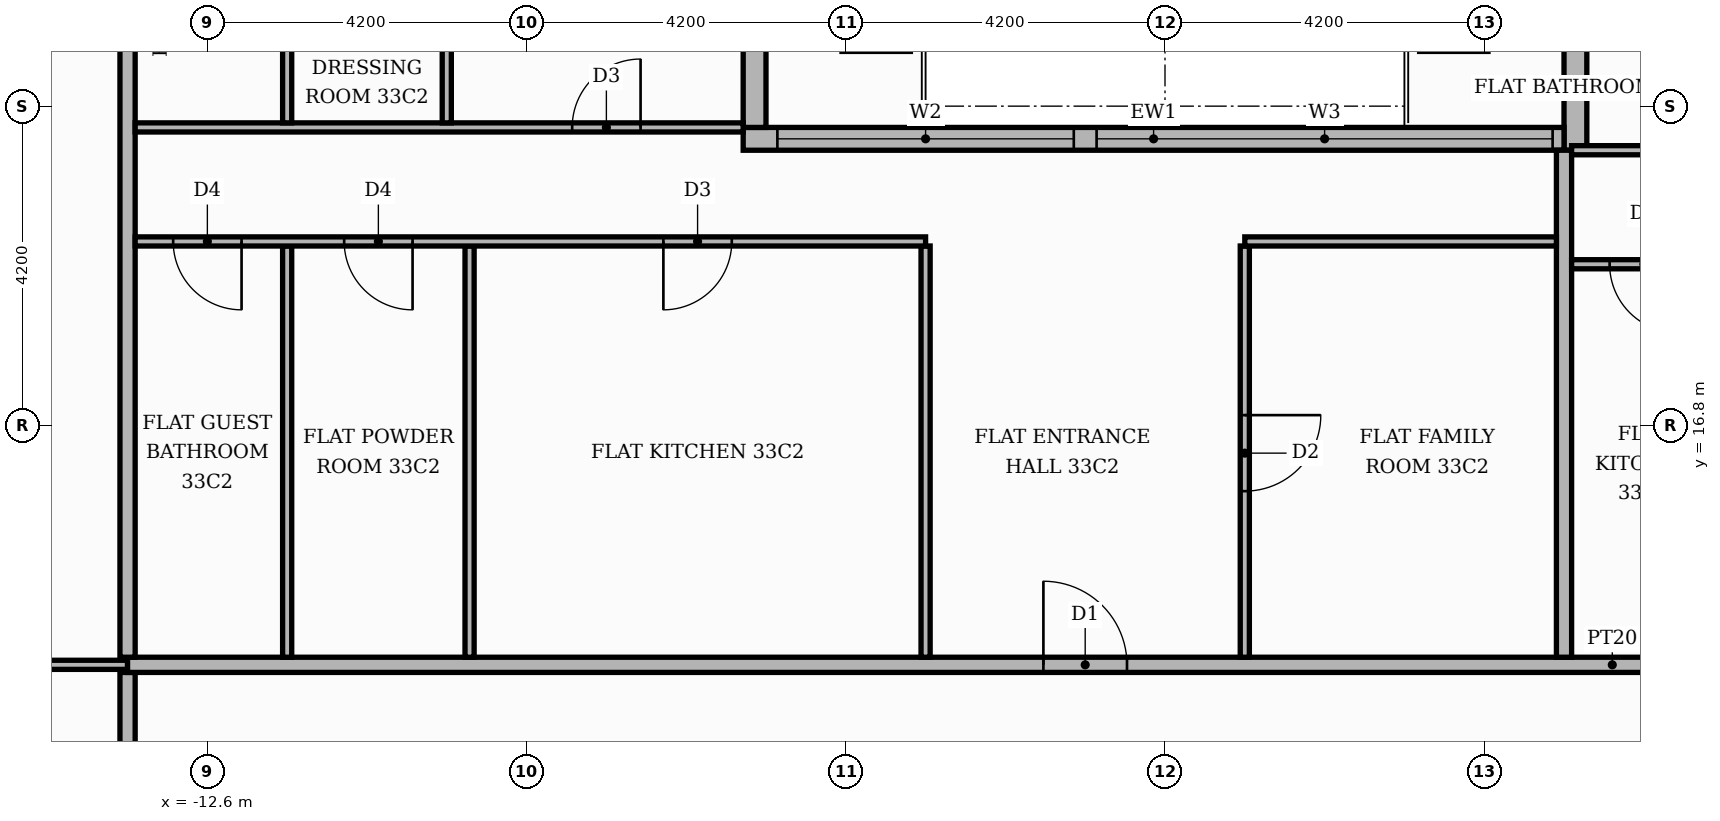
"""IFC4 building model, lengths in metres.
Left out: names, types, materials, properties, quantities, classifications, styles, units other than length and angle.
Written with IfcOpenShell. Run it as: python <this file> out.ifc"""

import sys

from ifc_helpers import new_model, si_unit, direction, frame, frame_2d, origin, place, context, subcontext, project, spatial, rectangle, extrude, element, fill, save


model = new_model("IFC4")
c1 = context("Model", 3, precision=1e-05, world=origin(), true_north=direction((0.0, 1.0)))
c2 = subcontext(c1, "Body", "Model", "MODEL_VIEW")
j1 = project(units=[si_unit("LENGTHUNIT", "METRE"), si_unit("PLANEANGLEUNIT", "RADIAN")], contexts=[c1])
p1 = place(None, origin())
s1 = spatial("IfcSite", under=j1, at=p1, CompositionType="ELEMENT")
p2 = place(p1, origin())
s2 = spatial("IfcBuilding", under=s1, at=p2, CompositionType="ELEMENT")
p3 = place(p2, frame((0.0, 0.0, 141.6)))
s3 = spatial("IfcBuildingStorey", under=s2, at=p3, CompositionType="ELEMENT", Elevation=141.6)
p4 = place(p3, frame((5.4, 25.42, 0.0), z_axis=(0.0, 0.0, 1.0), x_axis=(0.0, -1.0, 0.0)))
e1 = element("IfcWall", 1, at=p4, inside=s3, PredefinedType="STANDARD", context=c2, shape_type="SweptSolid", body=[
    extrude(rectangle(XDim=5.0, YDim=0.3, at=frame_2d((2.5, 0.0))), origin(), (0.0, 0.0, 1.0), 3.48),
])
p5 = place(p4, frame((1.42, 0.0, 0.0)))
e2 = element("IfcOpeningElement", 2, at=p5, cuts=e1, PredefinedType="OPENING", context=c2, shape_type="SweptSolid", body=[
    extrude(rectangle(XDim=1.8, YDim=2.4, at=frame_2d((0.9, 1.2))), frame((0.0, 0.16, 0.0), z_axis=(0.0, -1.0, 0.0), x_axis=(1.0, 0.0, 0.0)), (0.0, 0.0, 1.0), 0.32),
])
p6 = place(p3, frame((5.25, 20.57, 0.0), z_axis=(0.0, 0.0, 1.0), x_axis=(-1.0, 0.0, 0.0)))
e3 = element("IfcWall", 3, at=p6, inside=s3, PredefinedType="STANDARD", context=c2, shape_type="SweptSolid", body=[
    extrude(rectangle(XDim=10.8, YDim=0.3, at=frame_2d((5.4, 0.0))), origin(), (0.0, 0.0, 1.0), 3.48),
])
p7 = place(p6, frame((0.15, 0.0, 0.9)))
e4 = element("IfcOpeningElement", 4, at=p7, cuts=e3, PredefinedType="OPENING", context=c2, shape_type="SweptSolid", body=[
    extrude(rectangle(XDim=6.0, YDim=2.1, at=frame_2d((3.0, 1.05))), frame((0.0, 0.16, 0.0), z_axis=(0.0, -1.0, 0.0), x_axis=(1.0, 0.0, 0.0)), (0.0, 0.0, 1.0), 0.32),
])
p8 = place(p6, frame((6.45, 0.0, 0.9)))
e5 = element("IfcOpeningElement", 5, at=p8, cuts=e3, PredefinedType="OPENING", context=c2, shape_type="SweptSolid", body=[
    extrude(rectangle(XDim=3.9, YDim=2.1, at=frame_2d((1.95, 1.05))), frame((0.0, 0.16, 0.0), z_axis=(0.0, -1.0, 0.0), x_axis=(1.0, 0.0, 0.0)), (0.0, 0.0, 1.0), 0.32),
])
p9 = place(p3, frame((-5.4, 20.72, 0.0), z_axis=(0.0, 0.0, 1.0), x_axis=(0.0, 1.0, 0.0)))
e6 = element("IfcWall", 6, at=p9, inside=s3, PredefinedType="STANDARD", context=c2, shape_type="SweptSolid", body=[
    extrude(rectangle(XDim=5.0, YDim=0.3, at=frame_2d((2.5, 0.0))), origin(), (0.0, 0.0, 1.0), 3.48),
])
p10 = place(p9, frame((1.48, 0.0, 0.0)))
e7 = element("IfcOpeningElement", 7, at=p10, cuts=e6, PredefinedType="OPENING", context=c2, shape_type="SweptSolid", body=[
    extrude(rectangle(XDim=1.8, YDim=2.4, at=frame_2d((0.9, 1.2))), frame((0.0, 0.16, 0.0), z_axis=(0.0, -1.0, 0.0), x_axis=(1.0, 0.0, 0.0)), (0.0, 0.0, 1.0), 0.32),
])
p11 = place(p3, frame((-13.65, 11.1, 0.0), z_axis=(0.0, 0.0, 1.0), x_axis=(0.0, 1.0, 0.0)))
e8 = element("IfcWall", 8, at=p11, inside=s3, PredefinedType="PARTITIONING", context=c2, shape_type="SweptSolid", body=[
    extrude(rectangle(XDim=2.45, YDim=0.2, at=frame_2d((1.225, 0.0))), origin(), (0.0, 0.0, 1.0), 3.48),
])
p12 = place(p3, frame((-20.42, 13.65, 0.0), z_axis=(0.0, 0.0, 1.0), x_axis=(1.0, 0.0, 0.0)))
e9 = element("IfcWall", 9, at=p12, inside=s3, PredefinedType="PARTITIONING", context=c2, shape_type="SweptSolid", body=[
    extrude(rectangle(XDim=6.77, YDim=0.12, at=frame_2d((3.385, 0.0))), origin(), (0.0, 0.0, 1.0), 3.48),
])
p13 = place(p12, frame((2.935, 0.0, 0.0)))
e10 = element("IfcOpeningElement", 10, at=p13, cuts=e9, PredefinedType="OPENING", context=c2, shape_type="SweptSolid", body=[
    extrude(rectangle(XDim=0.9, YDim=2.1, at=frame_2d((0.45, 1.05))), frame((0.0, 0.07, 0.0), z_axis=(0.0, -1.0, 0.0), x_axis=(1.0, 0.0, 0.0)), (0.0, 0.0, 1.0), 0.14),
])
p14 = place(p3, frame((-13.65, 13.65, 0.0), z_axis=(0.0, 0.0, 1.0), x_axis=(1.0, 0.0, 0.0)))
e11 = element("IfcWall", 11, at=p14, inside=s3, PredefinedType="PARTITIONING", context=c2, shape_type="SweptSolid", body=[
    extrude(rectangle(XDim=39.07, YDim=0.2, at=frame_2d((19.535, 0.0))), origin(), (0.0, 0.0, 1.0), 3.48),
])
p15 = place(p14, frame((24.65, 0.0, 0.0)))
e12 = element("IfcOpeningElement", 12, at=p15, cuts=e11, PredefinedType="OPENING", context=c2, shape_type="SweptSolid", body=[
    extrude(rectangle(XDim=1.1, YDim=2.4, at=frame_2d((0.55, 1.2))), frame((0.0, 0.11, 0.0), z_axis=(0.0, -1.0, 0.0), x_axis=(1.0, 0.0, 0.0)), (0.0, 0.0, 1.0), 0.22),
])
p16 = place(p14, frame((12.05, 0.0, 0.0)))
e13 = element("IfcOpeningElement", 13, at=p16, cuts=e11, PredefinedType="OPENING", context=c2, shape_type="SweptSolid", body=[
    extrude(rectangle(XDim=1.1, YDim=2.4, at=frame_2d((0.55, 1.2))), frame((0.0, 0.11, 0.0), z_axis=(0.0, -1.0, 0.0), x_axis=(1.0, 0.0, 0.0)), (0.0, 0.0, 1.0), 0.22),
])
p17 = place(p3, frame((-13.65, 13.75, 0.0), z_axis=(0.0, 0.0, 1.0), x_axis=(0.0, 1.0, 0.0)))
e14 = element("IfcWall", 14, at=p17, inside=s3, PredefinedType="PARTITIONING", context=c2, shape_type="SweptSolid", body=[
    extrude(rectangle(XDim=11.67, YDim=0.2, at=frame_2d((5.835, 0.0))), origin(), (0.0, 0.0, 1.0), 3.48),
])
for number, where, z_axis, x_axis in (
    (15, (-11.55, 13.75, 0.0), (0.0, 0.0, 1.0), (0.0, 1.0, 0.0)),
    (16, (-9.15, 13.75, 0.0), (0.0, 0.0, 1.0), (0.0, 1.0, 0.0)),
    (17, (-3.15, 13.75, 0.0), (0.0, 0.0, 1.0), (0.0, 1.0, 0.0)),
):
    element("IfcWall", number, at=place(p3, frame(where, z_axis=z_axis, x_axis=x_axis)), inside=s3, PredefinedType="PARTITIONING", context=c2, shape_type="SweptSolid", body=[
        extrude(rectangle(XDim=5.41, YDim=0.12, at=frame_2d((2.705, 0.0))), origin(), (0.0, 0.0, 1.0), 3.48),
    ])
p18 = place(p3, frame((1.05, 13.75, 0.0), z_axis=(0.0, 0.0, 1.0), x_axis=(0.0, 1.0, 0.0)))
e18 = element("IfcWall", 18, at=p18, inside=s3, PredefinedType="PARTITIONING", context=c2, shape_type="SweptSolid", body=[
    extrude(rectangle(XDim=5.41, YDim=0.12, at=frame_2d((2.705, 0.0))), origin(), (0.0, 0.0, 1.0), 3.48),
])
p19 = place(p18, frame((2.185, 0.0, 0.0)))
e19 = element("IfcOpeningElement", 19, at=p19, cuts=e18, PredefinedType="OPENING", context=c2, shape_type="SweptSolid", body=[
    extrude(rectangle(XDim=1.0, YDim=2.1, at=frame_2d((0.5, 1.05))), frame((0.0, 0.07, 0.0), z_axis=(0.0, -1.0, 0.0), x_axis=(1.0, 0.0, 0.0)), (0.0, 0.0, 1.0), 0.14),
])
p20 = place(p3, frame((5.25, 13.75, 0.0), z_axis=(0.0, 0.0, 1.0), x_axis=(0.0, 1.0, 0.0)))
e20 = element("IfcWall", 20, at=p20, inside=s3, PredefinedType="PARTITIONING", context=c2, shape_type="SweptSolid", body=[
    extrude(rectangle(XDim=6.67, YDim=0.2, at=frame_2d((3.335, 0.0))), origin(), (0.0, 0.0, 1.0), 3.48),
])
p21 = place(p3, frame((5.35, 18.92, 0.0), z_axis=(0.0, 0.0, 1.0), x_axis=(1.0, 0.0, 0.0)))
e21 = element("IfcWall", 21, at=p21, inside=s3, PredefinedType="PARTITIONING", context=c2, shape_type="SweptSolid", body=[
    extrude(rectangle(XDim=4.1, YDim=0.12, at=frame_2d((2.05, 0.0))), origin(), (0.0, 0.0, 1.0), 3.48),
])
p22 = place(p21, frame((0.5, 0.0, 0.0)))
e22 = element("IfcOpeningElement", 22, at=p22, cuts=e21, PredefinedType="OPENING", context=c2, shape_type="SweptSolid", body=[
    extrude(rectangle(XDim=0.9, YDim=2.1, at=frame_2d((0.45, 1.05))), frame((0.0, 0.07, 0.0), z_axis=(0.0, -1.0, 0.0), x_axis=(1.0, 0.0, 0.0)), (0.0, 0.0, 1.0), 0.14),
])
p23 = place(p3, frame((-13.55, 19.22, 0.0), z_axis=(0.0, 0.0, 1.0), x_axis=(1.0, 0.0, 0.0)))
e23 = element("IfcWall", 23, at=p23, inside=s3, PredefinedType="PARTITIONING", context=c2, shape_type="SweptSolid", body=[
    extrude(rectangle(XDim=10.4, YDim=0.12, at=frame_2d((5.2, 0.0))), origin(), (0.0, 0.0, 1.0), 3.48),
])
p24 = place(p23, frame((6.95, 0.0, 0.0)))
e24 = element("IfcOpeningElement", 24, at=p24, cuts=e23, PredefinedType="OPENING", context=c2, shape_type="SweptSolid", body=[
    extrude(rectangle(XDim=0.9, YDim=2.1, at=frame_2d((0.45, 1.05))), frame((0.0, 0.07, 0.0), z_axis=(0.0, -1.0, 0.0), x_axis=(1.0, 0.0, 0.0)), (0.0, 0.0, 1.0), 0.14),
])
p25 = place(p23, frame((2.75, 0.0, 0.0)))
e25 = element("IfcOpeningElement", 25, at=p25, cuts=e23, PredefinedType="OPENING", context=c2, shape_type="SweptSolid", body=[
    extrude(rectangle(XDim=0.9, YDim=2.1, at=frame_2d((0.45, 1.05))), frame((0.0, 0.07, 0.0), z_axis=(0.0, -1.0, 0.0), x_axis=(1.0, 0.0, 0.0)), (0.0, 0.0, 1.0), 0.14),
])
p26 = place(p23, frame((0.5, 0.0, 0.0)))
e26 = element("IfcOpeningElement", 26, at=p26, cuts=e23, PredefinedType="OPENING", context=c2, shape_type="SweptSolid", body=[
    extrude(rectangle(XDim=0.9, YDim=2.1, at=frame_2d((0.45, 1.05))), frame((0.0, 0.07, 0.0), z_axis=(0.0, -1.0, 0.0), x_axis=(1.0, 0.0, 0.0)), (0.0, 0.0, 1.0), 0.14),
])
p27 = place(p3, frame((1.05, 19.22, 0.0), z_axis=(0.0, 0.0, 1.0), x_axis=(1.0, 0.0, 0.0)))
e27 = element("IfcWall", 27, at=p27, inside=s3, PredefinedType="PARTITIONING", context=c2, shape_type="SweptSolid", body=[
    extrude(rectangle(XDim=4.1, YDim=0.12, at=frame_2d((2.05, 0.0))), origin(), (0.0, 0.0, 1.0), 3.48),
])
p28 = place(p3, frame((5.35, 20.42, 0.0), z_axis=(0.0, 0.0, 1.0), x_axis=(1.0, 0.0, 0.0)))
e28 = element("IfcWall", 28, at=p28, inside=s3, PredefinedType="PARTITIONING", context=c2, shape_type="SweptSolid", body=[
    extrude(rectangle(XDim=20.07, YDim=0.12, at=frame_2d((10.035, 0.0))), origin(), (0.0, 0.0, 1.0), 3.48),
])
p29 = place(p28, frame((8.85, 0.0, 0.0)))
e29 = element("IfcOpeningElement", 29, at=p29, cuts=e28, PredefinedType="OPENING", context=c2, shape_type="SweptSolid", body=[
    extrude(rectangle(XDim=1.0, YDim=2.1, at=frame_2d((0.5, 1.05))), frame((0.0, 0.07, 0.0), z_axis=(0.0, -1.0, 0.0), x_axis=(1.0, 0.0, 0.0)), (0.0, 0.0, 1.0), 0.14),
])
p30 = place(p28, frame((5.75, 0.0, 0.0)))
e30 = element("IfcOpeningElement", 30, at=p30, cuts=e28, PredefinedType="OPENING", context=c2, shape_type="SweptSolid", body=[
    extrude(rectangle(XDim=0.9, YDim=2.1, at=frame_2d((0.45, 1.05))), frame((0.0, 0.07, 0.0), z_axis=(0.0, -1.0, 0.0), x_axis=(1.0, 0.0, 0.0)), (0.0, 0.0, 1.0), 0.14),
])
p31 = place(p3, frame((-13.55, 20.72, 0.0), z_axis=(0.0, 0.0, 1.0), x_axis=(1.0, 0.0, 0.0)))
e31 = element("IfcWall", 31, at=p31, inside=s3, PredefinedType="PARTITIONING", context=c2, shape_type="SweptSolid", body=[
    extrude(rectangle(XDim=8.0, YDim=0.12, at=frame_2d((4.0, 0.0))), origin(), (0.0, 0.0, 1.0), 3.48),
])
p32 = place(p31, frame((5.75, 0.0, 0.0)))
e32 = element("IfcOpeningElement", 32, at=p32, cuts=e31, PredefinedType="OPENING", context=c2, shape_type="SweptSolid", body=[
    extrude(rectangle(XDim=0.9, YDim=2.1, at=frame_2d((0.45, 1.05))), frame((0.0, 0.07, 0.0), z_axis=(0.0, -1.0, 0.0), x_axis=(1.0, 0.0, 0.0)), (0.0, 0.0, 1.0), 0.14),
])
p33 = place(p3, frame((-11.55, 20.78, 0.0), z_axis=(0.0, 0.0, 1.0), x_axis=(0.0, 1.0, 0.0)))
e33 = element("IfcWall", 33, at=p33, inside=s3, PredefinedType="PARTITIONING", context=c2, shape_type="SweptSolid", body=[
    extrude(rectangle(XDim=4.64, YDim=0.12, at=frame_2d((2.32, 0.0))), origin(), (0.0, 0.0, 1.0), 3.48),
])
p34 = place(p33, frame((1.99, 0.0, 0.0)))
e34 = element("IfcOpeningElement", 34, at=p34, cuts=e33, PredefinedType="OPENING", context=c2, shape_type="SweptSolid", body=[
    extrude(rectangle(XDim=0.9, YDim=2.1, at=frame_2d((0.45, 1.05))), frame((0.0, 0.07, 0.0), z_axis=(0.0, -1.0, 0.0), x_axis=(1.0, 0.0, 0.0)), (0.0, 0.0, 1.0), 0.14),
])
p35 = place(p3, frame((-9.45, 20.78, 0.0), z_axis=(0.0, 0.0, 1.0), x_axis=(0.0, 1.0, 0.0)))
e35 = element("IfcWall", 35, at=p35, inside=s3, PredefinedType="PARTITIONING", context=c2, shape_type="SweptSolid", body=[
    extrude(rectangle(XDim=4.64, YDim=0.12, at=frame_2d((2.32, 0.0))), origin(), (0.0, 0.0, 1.0), 3.48),
])
p36 = place(p35, frame((1.99, 0.0, 0.0)))
e36 = element("IfcOpeningElement", 36, at=p36, cuts=e35, PredefinedType="OPENING", context=c2, shape_type="SweptSolid", body=[
    extrude(rectangle(XDim=0.9, YDim=2.1, at=frame_2d((0.45, 1.05))), frame((0.0, 0.07, 0.0), z_axis=(0.0, -1.0, 0.0), x_axis=(1.0, 0.0, 0.0)), (0.0, 0.0, 1.0), 0.14),
])
p37 = place(p7, origin())
e37 = element("IfcWindow", 37, at=p37, inside=s3, PartitioningType="SINGLE_PANEL", PredefinedType="WINDOW", context=c2, shape_type="SweptSolid", body=[
    extrude(rectangle(XDim=6.0, YDim=2.1, at=frame_2d((3.0, 1.05))), frame((0.0, 0.03, 0.0), z_axis=(0.0, -1.0, 0.0), x_axis=(1.0, 0.0, 0.0)), (0.0, 0.0, 1.0), 0.06),
])
fill(e4, e37)
p38 = place(p8, origin())
e38 = element("IfcWindow", 38, at=p38, inside=s3, PartitioningType="SINGLE_PANEL", PredefinedType="WINDOW", context=c2, shape_type="SweptSolid", body=[
    extrude(rectangle(XDim=3.9, YDim=2.1, at=frame_2d((1.95, 1.05))), frame((0.0, 0.03, 0.0), z_axis=(0.0, -1.0, 0.0), x_axis=(1.0, 0.0, 0.0)), (0.0, 0.0, 1.0), 0.06),
])
fill(e5, e38)
p39 = place(p22, frame((0.9, 0.0, 0.0), z_axis=(0.0, 0.0, 1.0), x_axis=(-1.0, 0.0, 0.0)))
e39 = element("IfcDoor", 39, at=p39, inside=s3, OperationType="SINGLE_SWING_RIGHT", PredefinedType="DOOR", context=c2, shape_type="SweptSolid", body=[
    extrude(rectangle(XDim=0.9, YDim=2.1, at=frame_2d((0.45, 1.05))), frame((0.0, 0.025, 0.0), z_axis=(0.0, -1.0, 0.0), x_axis=(1.0, 0.0, 0.0)), (0.0, 0.0, 1.0), 0.05),
])
fill(e22, e39)
p40 = place(p16, origin())
e40 = element("IfcDoor", 40, at=p40, inside=s3, OperationType="SINGLE_SWING_LEFT", PredefinedType="DOOR", context=c2, shape_type="SweptSolid", body=[
    extrude(rectangle(XDim=1.1, YDim=2.4, at=frame_2d((0.55, 1.2))), frame((0.0, 0.025, 0.0), z_axis=(0.0, -1.0, 0.0), x_axis=(1.0, 0.0, 0.0)), (0.0, 0.0, 1.0), 0.05),
])
fill(e13, e40)
p41 = place(p19, frame((1.0, 0.0, 0.0), z_axis=(0.0, 0.0, 1.0), x_axis=(-1.0, 0.0, 0.0)))
e41 = element("IfcDoor", 41, at=p41, inside=s3, OperationType="SINGLE_SWING_RIGHT", PredefinedType="DOOR", context=c2, shape_type="SweptSolid", body=[
    extrude(rectangle(XDim=1.0, YDim=2.1, at=frame_2d((0.5, 1.05))), frame((0.0, 0.025, 0.0), z_axis=(0.0, -1.0, 0.0), x_axis=(1.0, 0.0, 0.0)), (0.0, 0.0, 1.0), 0.05),
])
fill(e19, e41)
p42 = place(p24, frame((0.9, 0.0, 0.0), z_axis=(0.0, 0.0, 1.0), x_axis=(-1.0, 0.0, 0.0)))
e42 = element("IfcDoor", 42, at=p42, inside=s3, OperationType="SINGLE_SWING_LEFT", PredefinedType="DOOR", context=c2, shape_type="SweptSolid", body=[
    extrude(rectangle(XDim=0.9, YDim=2.1, at=frame_2d((0.45, 1.05))), frame((0.0, 0.025, 0.0), z_axis=(0.0, -1.0, 0.0), x_axis=(1.0, 0.0, 0.0)), (0.0, 0.0, 1.0), 0.05),
])
fill(e24, e42)
p43 = place(p25, frame((0.9, 0.0, 0.0), z_axis=(0.0, 0.0, 1.0), x_axis=(-1.0, 0.0, 0.0)))
e43 = element("IfcDoor", 43, at=p43, inside=s3, OperationType="SINGLE_SWING_RIGHT", PredefinedType="DOOR", context=c2, shape_type="SweptSolid", body=[
    extrude(rectangle(XDim=0.9, YDim=2.1, at=frame_2d((0.45, 1.05))), frame((0.0, 0.025, 0.0), z_axis=(0.0, -1.0, 0.0), x_axis=(1.0, 0.0, 0.0)), (0.0, 0.0, 1.0), 0.05),
])
fill(e25, e43)
p44 = place(p26, frame((0.9, 0.0, 0.0), z_axis=(0.0, 0.0, 1.0), x_axis=(-1.0, 0.0, 0.0)))
e44 = element("IfcDoor", 44, at=p44, inside=s3, OperationType="SINGLE_SWING_RIGHT", PredefinedType="DOOR", context=c2, shape_type="SweptSolid", body=[
    extrude(rectangle(XDim=0.9, YDim=2.1, at=frame_2d((0.45, 1.05))), frame((0.0, 0.025, 0.0), z_axis=(0.0, -1.0, 0.0), x_axis=(1.0, 0.0, 0.0)), (0.0, 0.0, 1.0), 0.05),
])
fill(e26, e44)
p45 = place(p32, origin())
e45 = element("IfcDoor", 45, at=p45, inside=s3, OperationType="SINGLE_SWING_RIGHT", PredefinedType="DOOR", context=c2, shape_type="SweptSolid", body=[
    extrude(rectangle(XDim=0.9, YDim=2.1, at=frame_2d((0.45, 1.05))), frame((0.0, 0.025, 0.0), z_axis=(0.0, -1.0, 0.0), x_axis=(1.0, 0.0, 0.0)), (0.0, 0.0, 1.0), 0.05),
])
fill(e32, e45)
save(model, sys.argv[1])
